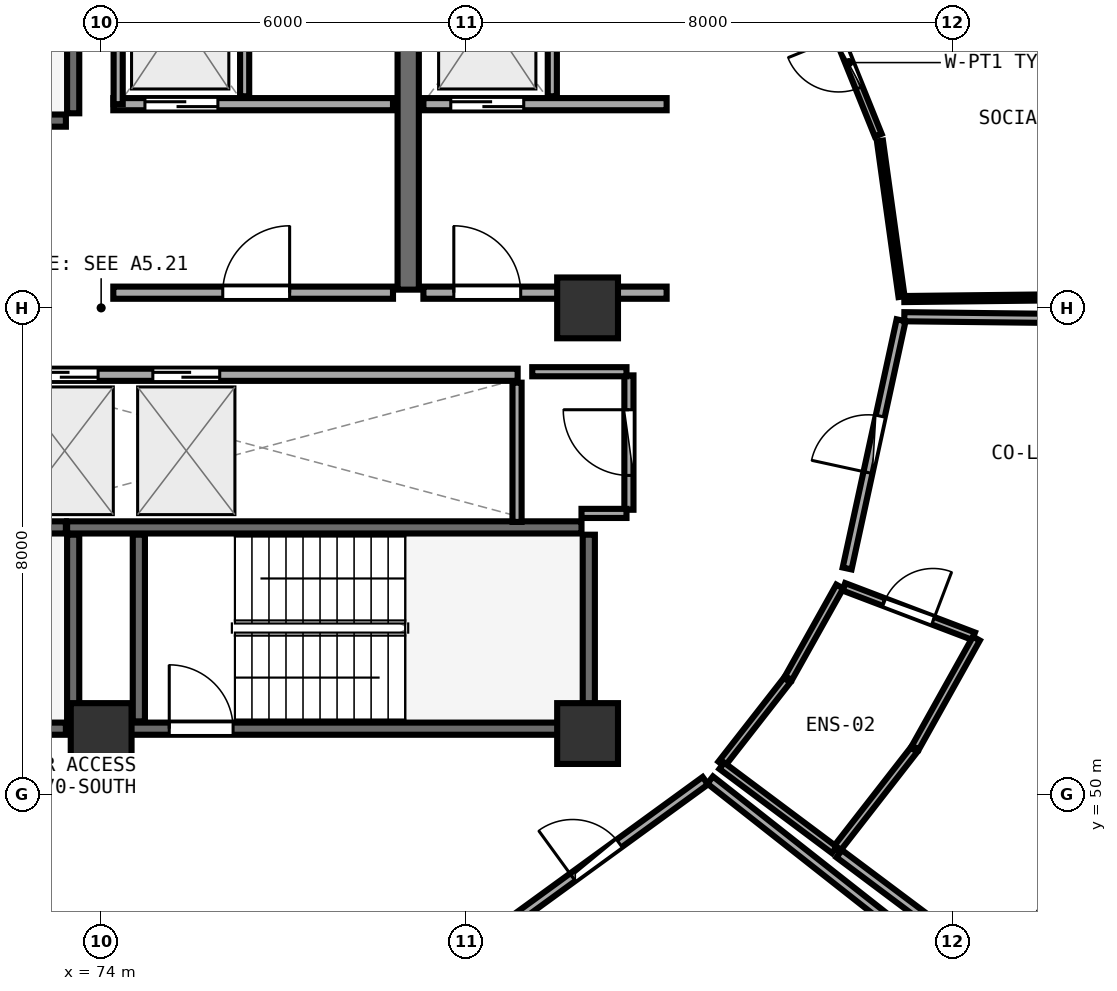
"""IFC4 building model, lengths in metres.
Left out: names, types, materials, properties, quantities, classifications, styles, units other than length and angle.
Written with IfcOpenShell. Run it as: python <this file> out.ifc"""

import sys

from ifc_helpers import new_model, si_unit, direction, frame, frame_2d, origin, origin_2d, place, context, subcontext, project, spatial, rectangle, extrude, element, fill, save


model = new_model("IFC4")
c1 = context("Model", 3, precision=1e-05, world=origin(), true_north=direction((0.0, 1.0)))
c2 = subcontext(c1, "Body", "Model", "MODEL_VIEW")
j1 = project(units=[si_unit("LENGTHUNIT", "METRE"), si_unit("PLANEANGLEUNIT", "RADIAN")], contexts=[c1])
p1 = place(None, origin())
s1 = spatial("IfcSite", under=j1, at=p1, CompositionType="ELEMENT")
p2 = place(p1, origin())
s2 = spatial("IfcBuilding", under=s1, at=p2, CompositionType="ELEMENT")
p3 = place(p2, frame((0.0, 0.0, 274.95)))
s3 = spatial("IfcBuildingStorey", under=s2, at=p3, CompositionType="ELEMENT", Elevation=274.95)
for number, where, z_axis, x_axis in (
    (1, (74.0, 51.0, 0.0), (0.0, 0.0, 1.0), (1.0, 0.0, 0.0)),
    (2, (82.0, 51.0, 0.0), (0.0, 0.0, 1.0), (1.0, 0.0, 0.0)),
    (3, (82.0, 58.0, 0.0), (0.0, 0.0, 1.0), (1.0, 0.0, 0.0)),
):
    element("IfcColumn", number, at=place(p3, frame(where, z_axis=z_axis, x_axis=x_axis)), inside=s3, PredefinedType="PILASTER", context=c2, shape_type="SweptSolid", body=[
        extrude(rectangle(XDim=1.0, YDim=1.0, at=origin_2d()), origin(), (0.0, 0.0, 1.0), 3.75),
    ])
p4 = place(p3, frame((66.26, 61.08, 0.0), z_axis=(0.0, 0.0, 1.0), x_axis=(1.0, 0.0, 0.0)))
e4 = element("IfcWall", 4, at=p4, inside=s3, PredefinedType="SHEAR", context=c2, shape_type="SweptSolid", body=[
    extrude(rectangle(XDim=7.16, YDim=0.2, at=frame_2d((3.58, 0.0))), origin(), (0.0, 0.0, 1.0), 3.49),
])
p5 = place(p3, frame((73.54, 61.2, 0.0), z_axis=(0.0, 0.0, 1.0), x_axis=(0.0, 1.0, 0.0)))
e5 = element("IfcWall", 5, at=p5, inside=s3, PredefinedType="SHEAR", context=c2, shape_type="SweptSolid", body=[
    extrude(rectangle(XDim=3.07, YDim=0.2, at=frame_2d((1.535, 0.0))), origin(), (0.0, 0.0, 1.0), 3.49),
])
p6 = place(p3, frame((74.0, 51.08, 0.0), z_axis=(0.0, 0.0, 1.0), x_axis=(1.0, 0.0, 0.0)))
e6 = element("IfcWall", 6, at=p6, inside=s3, PredefinedType="SHEAR", context=c2, shape_type="SweptSolid", body=[
    extrude(rectangle(XDim=7.9, YDim=0.2, at=frame_2d((3.95, 0.0))), origin(), (0.0, 0.0, 1.0), 3.49),
])
p7 = place(p6, frame((1.12, 0.0, 0.0)))
e7 = element("IfcOpeningElement", 7, at=p7, cuts=e6, PredefinedType="OPENING", context=c2, shape_type="SweptSolid", body=[
    extrude(rectangle(XDim=1.05, YDim=2.1, at=frame_2d((0.525, 1.05))), frame((0.0, 0.11, 0.0), z_axis=(0.0, -1.0, 0.0), x_axis=(1.0, 0.0, 0.0)), (0.0, 0.0, 1.0), 0.22),
])
p8 = place(p3, frame((82.02, 51.2, 0.0), z_axis=(0.0, 0.0, 1.0), x_axis=(0.0, 1.0, 0.0)))
e8 = element("IfcWall", 8, at=p8, inside=s3, PredefinedType="SHEAR", context=c2, shape_type="SweptSolid", body=[
    extrude(rectangle(XDim=3.07, YDim=0.2, at=frame_2d((1.535, 0.0))), origin(), (0.0, 0.0, 1.0), 3.49),
])
p9 = place(p3, frame((81.9, 54.39, 0.0), z_axis=(0.0, 0.0, 1.0), x_axis=(-1.0, 0.0, 0.0)))
e9 = element("IfcWall", 9, at=p9, inside=s3, PredefinedType="SHEAR", context=c2, shape_type="SweptSolid", body=[
    extrude(rectangle(XDim=8.46, YDim=0.2, at=frame_2d((4.23, 0.0))), origin(), (0.0, 0.0, 1.0), 3.49),
])
p10 = place(p3, frame((74.62, 54.27, 0.0), z_axis=(0.0, 0.0, 1.0), x_axis=(0.0, -1.0, 0.0)))
e10 = element("IfcWall", 10, at=p10, inside=s3, PredefinedType="SHEAR", context=c2, shape_type="SweptSolid", body=[
    extrude(rectangle(XDim=3.07, YDim=0.2, at=frame_2d((1.535, 0.0))), origin(), (0.0, 0.0, 1.0), 3.49),
])
p11 = place(p3, frame((66.26, 51.08, 0.0), z_axis=(0.0, 0.0, 1.0), x_axis=(1.0, 0.0, 0.0)))
e11 = element("IfcWall", 11, at=p11, inside=s3, PredefinedType="SHEAR", context=c2, shape_type="SweptSolid", body=[
    extrude(rectangle(XDim=7.16, YDim=0.2, at=frame_2d((3.58, 0.0))), origin(), (0.0, 0.0, 1.0), 3.49),
])
p12 = place(p3, frame((73.54, 51.2, 0.0), z_axis=(0.0, 0.0, 1.0), x_axis=(0.0, 1.0, 0.0)))
e12 = element("IfcWall", 12, at=p12, inside=s3, PredefinedType="SHEAR", context=c2, shape_type="SweptSolid", body=[
    extrude(rectangle(XDim=3.07, YDim=0.2, at=frame_2d((1.535, 0.0))), origin(), (0.0, 0.0, 1.0), 3.49),
])
p13 = place(p3, frame((73.42, 54.39, 0.0), z_axis=(0.0, 0.0, 1.0), x_axis=(-1.0, 0.0, 0.0)))
e13 = element("IfcWall", 13, at=p13, inside=s3, PredefinedType="SHEAR", context=c2, shape_type="SweptSolid", body=[
    extrude(rectangle(XDim=7.16, YDim=0.2, at=frame_2d((3.58, 0.0))), origin(), (0.0, 0.0, 1.0), 3.49),
])
p14 = place(p3, frame((79.05, 58.3, 0.0), z_axis=(0.0, 0.0, 1.0), x_axis=(0.0, 1.0, 0.0)))
e14 = element("IfcWall", 14, at=p14, inside=s3, PredefinedType="SHEAR", context=c2, shape_type="SweptSolid", body=[
    extrude(rectangle(XDim=6.3, YDim=0.35, at=frame_2d((3.15, 0.0))), origin(), (0.0, 0.0, 1.0), 3.49),
])
p15 = place(p3, frame((74.2, 61.35, 0.0), z_axis=(0.0, 0.0, 1.0), x_axis=(1.0, 0.0, 0.0)))
e15 = element("IfcWall", 15, at=p15, inside=s3, PredefinedType="SOLIDWALL", context=c2, shape_type="SweptSolid", body=[
    extrude(rectangle(XDim=4.6, YDim=0.2, at=frame_2d((2.3, 0.0))), origin(), (0.0, 0.0, 1.0), 3.48),
])
p16 = place(p15, frame((0.52, 0.0, 0.0)))
e16 = element("IfcOpeningElement", 16, at=p16, cuts=e15, PredefinedType="OPENING", context=c2, shape_type="SweptSolid", body=[
    extrude(rectangle(XDim=1.2, YDim=2.15, at=frame_2d((0.6, 1.075))), frame((0.0, 0.11, 0.0), z_axis=(0.0, -1.0, 0.0), x_axis=(1.0, 0.0, 0.0)), (0.0, 0.0, 1.0), 0.22),
])
p17 = place(p3, frame((74.28, 61.35, 0.0), z_axis=(0.0, 0.0, 1.0), x_axis=(0.0, 1.0, 0.0)))
e17 = element("IfcWall", 17, at=p17, inside=s3, PredefinedType="PARTITIONING", context=c2, shape_type="SweptSolid", body=[
    extrude(rectangle(XDim=2.97, YDim=0.15, at=frame_2d((1.485, 0.0))), origin(), (0.0, 0.0, 1.0), 3.48),
])
p18 = place(p3, frame((76.36, 61.48, 0.0), z_axis=(0.0, 0.0, 1.0), x_axis=(0.0, 1.0, 0.0)))
e18 = element("IfcWall", 18, at=p18, inside=s3, PredefinedType="PARTITIONING", context=c2, shape_type="SweptSolid", body=[
    extrude(rectangle(XDim=2.84, YDim=0.15, at=frame_2d((1.42, 0.0))), origin(), (0.0, 0.0, 1.0), 3.48),
])
p19 = place(p3, frame((79.3, 61.35, 0.0), z_axis=(0.0, 0.0, 1.0), x_axis=(1.0, 0.0, 0.0)))
e19 = element("IfcWall", 19, at=p19, inside=s3, PredefinedType="SOLIDWALL", context=c2, shape_type="SweptSolid", body=[
    extrude(rectangle(XDim=4.0, YDim=0.2, at=frame_2d((2.0, 0.0))), origin(), (0.0, 0.0, 1.0), 2.775),
])
p20 = place(p19, frame((0.45, 0.0, 0.0)))
e20 = element("IfcOpeningElement", 20, at=p20, cuts=e19, PredefinedType="OPENING", context=c2, shape_type="SweptSolid", body=[
    extrude(rectangle(XDim=1.2, YDim=2.15, at=frame_2d((0.6, 1.075))), frame((0.0, 0.11, 0.0), z_axis=(0.0, -1.0, 0.0), x_axis=(1.0, 0.0, 0.0)), (0.0, 0.0, 1.0), 0.22),
])
p21 = place(p3, frame((81.42, 61.48, 0.0), z_axis=(0.0, 0.0, 1.0), x_axis=(0.0, 1.0, 0.0)))
e21 = element("IfcWall", 21, at=p21, inside=s3, PredefinedType="PARTITIONING", context=c2, shape_type="SweptSolid", body=[
    extrude(rectangle(XDim=2.84, YDim=0.15, at=frame_2d((1.42, 0.0))), origin(), (0.0, 0.0, 1.0), 3.48),
])
p22 = place(p3, frame((74.2, 58.25, 0.0), z_axis=(0.0, 0.0, 1.0), x_axis=(1.0, 0.0, 0.0)))
e22 = element("IfcWall", 22, at=p22, inside=s3, PredefinedType="SOLIDWALL", context=c2, shape_type="SweptSolid", body=[
    extrude(rectangle(XDim=4.6, YDim=0.2, at=frame_2d((2.3, 0.0))), origin(), (0.0, 0.0, 1.0), 3.48),
])
p23 = place(p22, frame((1.8, 0.0, 0.0)))
e23 = element("IfcOpeningElement", 23, at=p23, cuts=e22, PredefinedType="OPENING", context=c2, shape_type="SweptSolid", body=[
    extrude(rectangle(XDim=1.1, YDim=2.1, at=frame_2d((0.55, 1.05))), frame((0.0, 0.11, 0.0), z_axis=(0.0, -1.0, 0.0), x_axis=(1.0, 0.0, 0.0)), (0.0, 0.0, 1.0), 0.22),
])
p24 = place(p3, frame((79.3, 58.25, 0.0), z_axis=(0.0, 0.0, 1.0), x_axis=(1.0, 0.0, 0.0)))
e24 = element("IfcWall", 24, at=p24, inside=s3, PredefinedType="SOLIDWALL", context=c2, shape_type="SweptSolid", body=[
    extrude(rectangle(XDim=4.0, YDim=0.2, at=frame_2d((2.0, 0.0))), origin(), (0.0, 0.0, 1.0), 2.775),
])
p25 = place(p24, frame((0.5, 0.0, 0.0)))
e25 = element("IfcOpeningElement", 25, at=p25, cuts=e24, PredefinedType="OPENING", context=c2, shape_type="SweptSolid", body=[
    extrude(rectangle(XDim=1.1, YDim=2.1, at=frame_2d((0.55, 1.05))), frame((0.0, 0.11, 0.0), z_axis=(0.0, -1.0, 0.0), x_axis=(1.0, 0.0, 0.0)), (0.0, 0.0, 1.0), 0.22),
])
p26 = place(p3, frame((72.45, 56.9, 0.0), z_axis=(0.0, 0.0, 1.0), x_axis=(1.0, 0.0, 0.0)))
e26 = element("IfcWall", 26, at=p26, inside=s3, PredefinedType="SOLIDWALL", context=c2, shape_type="SweptSolid", body=[
    extrude(rectangle(XDim=8.4, YDim=0.2, at=frame_2d((4.2, 0.0))), origin(), (0.0, 0.0, 1.0), 3.48),
])
p27 = place(p26, frame((0.4, 0.0, 0.0)))
e27 = element("IfcOpeningElement", 27, at=p27, cuts=e26, PredefinedType="OPENING", context=c2, shape_type="SweptSolid", body=[
    extrude(rectangle(XDim=1.1, YDim=2.1, at=frame_2d((0.55, 1.05))), frame((0.0, 0.11, 0.0), z_axis=(0.0, -1.0, 0.0), x_axis=(1.0, 0.0, 0.0)), (0.0, 0.0, 1.0), 0.22),
])
p28 = place(p26, frame((2.4, 0.0, 0.0)))
e28 = element("IfcOpeningElement", 28, at=p28, cuts=e26, PredefinedType="OPENING", context=c2, shape_type="SweptSolid", body=[
    extrude(rectangle(XDim=1.1, YDim=2.1, at=frame_2d((0.55, 1.05))), frame((0.0, 0.11, 0.0), z_axis=(0.0, -1.0, 0.0), x_axis=(1.0, 0.0, 0.0)), (0.0, 0.0, 1.0), 0.22),
])
p29 = place(p3, frame((80.84, 54.48, 0.0), z_axis=(0.0, 0.0, 1.0), x_axis=(0.0, 1.0, 0.0)))
e29 = element("IfcWall", 29, at=p29, inside=s3, PredefinedType="PARTITIONING", context=c2, shape_type="SweptSolid", body=[
    extrude(rectangle(XDim=2.29, YDim=0.15, at=frame_2d((1.145, 0.0))), origin(), (0.0, 0.0, 1.0), 3.48),
])
p30 = place(p3, frame((82.68, 54.68, 0.0), z_axis=(0.0, 0.0, 1.0), x_axis=(0.0, 1.0, 0.0)))
e30 = element("IfcWall", 30, at=p30, inside=s3, PredefinedType="PARTITIONING", context=c2, shape_type="SweptSolid", body=[
    extrude(rectangle(XDim=2.21, YDim=0.15, at=frame_2d((1.105, 0.0))), origin(), (0.0, 0.0, 1.0), 3.48),
])
p31 = place(p30, frame((0.565, 0.0, 0.0)))
e31 = element("IfcOpeningElement", 31, at=p31, cuts=e30, PredefinedType="OPENING", context=c2, shape_type="SweptSolid", body=[
    extrude(rectangle(XDim=1.08, YDim=2.1, at=frame_2d((0.54, 1.05))), frame((0.0, 0.085, 0.0), z_axis=(0.0, -1.0, 0.0), x_axis=(1.0, 0.0, 0.0)), (0.0, 0.0, 1.0), 0.17),
])
p32 = place(p3, frame((80.34, 47.607, 0.0), z_axis=(0.0, 0.0, 1.0), x_axis=(0.808603155837, 0.588354430909, 0.0)))
e32 = element("IfcWall", 32, at=p32, inside=s3, PredefinedType="PARTITIONING", context=c2, shape_type="SweptSolid", body=[
    extrude(rectangle(XDim=4.448, YDim=0.15, at=frame_2d((2.224, 0.0))), origin(), (0.0, 0.0, 1.0), 3.075),
])
p33 = place(p32, frame((1.749, 0.0, 0.0)))
e33 = element("IfcOpeningElement", 33, at=p33, cuts=e32, PredefinedType="OPENING", context=c2, shape_type="SweptSolid", body=[
    extrude(rectangle(XDim=0.95, YDim=2.08, at=frame_2d((0.475, 1.04))), frame((0.0, 0.085, 0.0), z_axis=(0.0, -1.0, 0.0), x_axis=(1.0, 0.0, 0.0)), (0.0, 0.0, 1.0), 0.17),
])
p34 = place(p3, frame((86.213, 53.414, 0.0), z_axis=(0.0, 0.0, 1.0), x_axis=(0.934596057468, -0.355710850784, 0.0)))
e34 = element("IfcWall", 34, at=p34, inside=s3, PredefinedType="PLUMBINGWALL", context=c2, shape_type="SweptSolid", body=[
    extrude(rectangle(XDim=2.284, YDim=0.13, at=frame_2d((1.142, 0.0))), origin(), (0.0, 0.0, 1.0), 3.175),
])
p35 = place(p34, frame((0.712, 0.0, 0.0)))
e35 = element("IfcOpeningElement", 35, at=p35, cuts=e34, PredefinedType="OPENING", context=c2, shape_type="SweptSolid", body=[
    extrude(rectangle(XDim=0.86, YDim=2.05, at=frame_2d((0.43, 1.025))), frame((0.0, 0.075, 0.0), z_axis=(0.0, -1.0, 0.0), x_axis=(1.0, 0.0, 0.0)), (0.0, 0.0, 1.0), 0.15),
])
p36 = place(p3, frame((86.269, 53.715, 0.0), z_axis=(0.0, 0.0, 1.0), x_axis=(0.212453909159, 0.977171088645, 0.0)))
e36 = element("IfcWall", 36, at=p36, inside=s3, PredefinedType="PARTITIONING", context=c2, shape_type="SweptSolid", body=[
    extrude(rectangle(XDim=4.177, YDim=0.15, at=frame_2d((2.089, 0.0))), origin(), (0.0, 0.0, 1.0), 3.48),
])
p37 = place(p36, frame((1.614, 0.0, 0.0)))
e37 = element("IfcOpeningElement", 37, at=p37, cuts=e36, PredefinedType="OPENING", context=c2, shape_type="SweptSolid", body=[
    extrude(rectangle(XDim=0.95, YDim=2.08, at=frame_2d((0.475, 1.04))), frame((0.0, 0.085, 0.0), z_axis=(0.0, -1.0, 0.0), x_axis=(1.0, 0.0, 0.0)), (0.0, 0.0, 1.0), 0.17),
])
p38 = place(p3, frame((86.781, 60.84, 0.0), z_axis=(0.0, 0.0, 1.0), x_axis=(-0.374574284654, 0.927196907499, 0.0)))
e38 = element("IfcWall", 38, at=p38, inside=s3, PredefinedType="PARTITIONING", context=c2, shape_type="SweptSolid", body=[
    extrude(rectangle(XDim=2.576, YDim=0.12, at=frame_2d((1.288, 0.0))), origin(), (0.0, 0.0, 1.0), 3.48),
])
p39 = place(p38, frame((0.838, 0.0, 0.0)))
e39 = element("IfcOpeningElement", 39, at=p39, cuts=e38, PredefinedType="OPENING", context=c2, shape_type="SweptSolid", body=[
    extrude(rectangle(XDim=0.9, YDim=2.08, at=frame_2d((0.45, 1.04))), frame((0.0, 0.07, 0.0), z_axis=(0.0, -1.0, 0.0), x_axis=(1.0, 0.0, 0.0)), (0.0, 0.0, 1.0), 0.14),
])
p40 = place(p3, frame((81.9, 54.62, 0.0), z_axis=(0.0, 0.0, 1.0), x_axis=(1.0, 0.0, 0.0)))
e40 = element("IfcWall", 40, at=p40, inside=s3, PredefinedType="PARTITIONING", context=c2, shape_type="SweptSolid", body=[
    extrude(rectangle(XDim=0.74, YDim=0.15, at=frame_2d((0.37, 0.0))), origin(), (0.0, 0.0, 1.0), 2.775),
])
p41 = place(p3, frame((82.64, 56.95, 0.0), z_axis=(0.0, 0.0, 1.0), x_axis=(-1.0, 0.0, 0.0)))
e41 = element("IfcWall", 41, at=p41, inside=s3, PredefinedType="PARTITIONING", context=c2, shape_type="SweptSolid", body=[
    extrude(rectangle(XDim=1.55, YDim=0.15, at=frame_2d((0.775, 0.0))), origin(), (0.0, 0.0, 1.0), 2.775),
])
p42 = place(p3, frame((84.016, 50.235, 0.0), z_axis=(0.0, 0.0, 1.0), x_axis=(0.785736749878, -0.618561039745, 0.0)))
e42 = element("IfcWall", 42, at=p42, inside=s3, PredefinedType="PARTITIONING", context=c2, shape_type="SweptSolid", body=[
    extrude(rectangle(XDim=4.475, YDim=0.15, at=frame_2d((2.237, 0.0))), origin(), (0.0, 0.0, 1.0), 3.075),
])
p43 = place(p3, frame((84.203, 50.498, 0.0), z_axis=(0.0, 0.0, 1.0), x_axis=(0.615627813602, 0.78803705187, 0.0)))
e43 = element("IfcWall", 43, at=p43, inside=s3, PredefinedType="PLUMBINGWALL", context=c2, shape_type="SweptSolid", body=[
    extrude(rectangle(XDim=1.752, YDim=0.13, at=frame_2d((0.876, 0.0))), origin(), (0.0, 0.0, 1.0), 3.075),
])
p44 = place(p3, frame((85.304, 51.911, 0.0), z_axis=(0.0, 0.0, 1.0), x_axis=(0.488642128311, 0.872484309566, 0.0)))
e44 = element("IfcWall", 44, at=p44, inside=s3, PredefinedType="PLUMBINGWALL", context=c2, shape_type="SweptSolid", body=[
    extrude(rectangle(XDim=1.726, YDim=0.13, at=frame_2d((0.863, 0.0))), origin(), (0.0, 0.0, 1.0), 3.235),
])
p45 = place(p3, frame((88.394, 52.562, 0.0), z_axis=(0.0, 0.0, 1.0), x_axis=(-0.487959720546, -0.872866147313, 0.0)))
e45 = element("IfcWall", 45, at=p45, inside=s3, PredefinedType="PLUMBINGWALL", context=c2, shape_type="SweptSolid", body=[
    extrude(rectangle(XDim=2.056, YDim=0.13, at=frame_2d((1.028, 0.0))), origin(), (0.0, 0.0, 1.0), 3.075),
])
p46 = place(p3, frame((87.369, 50.734, 0.0), z_axis=(0.0, 0.0, 1.0), x_axis=(-0.614418714287, -0.788980128732, 0.0)))
e46 = element("IfcWall", 46, at=p46, inside=s3, PredefinedType="PLUMBINGWALL", context=c2, shape_type="SweptSolid", body=[
    extrude(rectangle(XDim=2.085, YDim=0.13, at=frame_2d((1.042, 0.0))), origin(), (0.0, 0.0, 1.0), 3.48),
])
p47 = place(p3, frame((86.059, 49.085, 0.0), z_axis=(0.0, 0.0, 1.0), x_axis=(-0.800835318147, 0.598884624288, 0.0)))
e47 = element("IfcWall", 47, at=p47, inside=s3, PredefinedType="PLUMBINGWALL", context=c2, shape_type="SweptSolid", body=[
    extrude(rectangle(XDim=2.313, YDim=0.13, at=frame_2d((1.156, 0.0))), origin(), (0.0, 0.0, 1.0), 3.175),
])
p48 = place(p3, frame((87.209, 57.854, 0.0), z_axis=(0.0, 0.0, 1.0), x_axis=(0.999937174585, -0.01120923205, 0.0)))
e48 = element("IfcWall", 48, at=p48, inside=s3, PredefinedType="PARTITIONING", context=c2, shape_type="SweptSolid", body=[
    extrude(rectangle(XDim=4.639, YDim=0.15, at=frame_2d((2.32, 0.0))), origin(), (0.0, 0.0, 1.0), 3.075),
])
p49 = place(p3, frame((87.756, 47.812, 0.0), z_axis=(0.0, 0.0, 1.0), x_axis=(-0.800376717426, 0.599497381314, 0.0)))
e49 = element("IfcWall", 49, at=p49, inside=s3, PredefinedType="PARTITIONING", context=c2, shape_type="SweptSolid", body=[
    extrude(rectangle(XDim=2.021, YDim=0.15, at=frame_2d((1.011, 0.0))), origin(), (0.0, 0.0, 1.0), 3.235),
])
p50 = place(p3, frame((87.164, 58.185, 0.0), z_axis=(0.0, 0.0, 1.0), x_axis=(-0.137359832701, 0.990521214493, 0.0)))
e50 = element("IfcWall", 50, at=p50, inside=s3, PredefinedType="PARTITIONING", context=c2, shape_type="SweptSolid", body=[
    extrude(rectangle(XDim=2.584, YDim=0.1, at=frame_2d((1.292, 0.0))), origin(), (0.0, 0.0, 1.0), 3.48),
])
p51 = place(p3, frame((91.848, 58.198, 0.0), z_axis=(0.0, 0.0, 1.0), x_axis=(-0.999937174585, -0.01120923205, 0.0)))
e51 = element("IfcWall", 51, at=p51, inside=s3, PredefinedType="PARTITIONING", context=c2, shape_type="SweptSolid", body=[
    extrude(rectangle(XDim=4.639, YDim=0.1, at=frame_2d((2.32, 0.0))), origin(), (0.0, 0.0, 1.0), 3.075),
])
p52 = place(p7, origin())
e52 = element("IfcDoor", 52, at=p52, inside=s3, OperationType="SINGLE_SWING_LEFT", PredefinedType="DOOR", context=c2, shape_type="SweptSolid", body=[
    extrude(rectangle(XDim=1.05, YDim=2.1, at=frame_2d((0.525, 1.05))), frame((0.0, 0.025, 0.0), z_axis=(0.0, -1.0, 0.0), x_axis=(1.0, 0.0, 0.0)), (0.0, 0.0, 1.0), 0.05),
])
fill(e7, e52)
p53 = place(p16, origin())
e53 = element("IfcDoor", 53, at=p53, inside=s3, OperationType="DOUBLE_DOOR_SLIDING", PredefinedType="DOOR", context=c2, shape_type="SweptSolid", body=[
    extrude(rectangle(XDim=1.2, YDim=2.15, at=frame_2d((0.6, 1.075))), frame((0.0, 0.025, 0.0), z_axis=(0.0, -1.0, 0.0), x_axis=(1.0, 0.0, 0.0)), (0.0, 0.0, 1.0), 0.05),
])
fill(e16, e53)
p54 = place(p20, origin())
e54 = element("IfcDoor", 54, at=p54, inside=s3, OperationType="DOUBLE_DOOR_SLIDING", PredefinedType="DOOR", context=c2, shape_type="SweptSolid", body=[
    extrude(rectangle(XDim=1.2, YDim=2.15, at=frame_2d((0.6, 1.075))), frame((0.0, 0.025, 0.0), z_axis=(0.0, -1.0, 0.0), x_axis=(1.0, 0.0, 0.0)), (0.0, 0.0, 1.0), 0.05),
])
fill(e20, e54)
p55 = place(p23, frame((1.1, 0.0, 0.0), z_axis=(0.0, 0.0, 1.0), x_axis=(-1.0, 0.0, 0.0)))
e55 = element("IfcDoor", 55, at=p55, inside=s3, OperationType="SINGLE_SWING_LEFT", PredefinedType="DOOR", context=c2, shape_type="SweptSolid", body=[
    extrude(rectangle(XDim=1.1, YDim=2.1, at=frame_2d((0.55, 1.05))), frame((0.0, 0.025, 0.0), z_axis=(0.0, -1.0, 0.0), x_axis=(1.0, 0.0, 0.0)), (0.0, 0.0, 1.0), 0.05),
])
fill(e23, e55)
p56 = place(p25, frame((1.1, 0.0, 0.0), z_axis=(0.0, 0.0, 1.0), x_axis=(-1.0, 0.0, 0.0)))
e56 = element("IfcDoor", 56, at=p56, inside=s3, OperationType="SINGLE_SWING_RIGHT", PredefinedType="DOOR", context=c2, shape_type="SweptSolid", body=[
    extrude(rectangle(XDim=1.1, YDim=2.1, at=frame_2d((0.55, 1.05))), frame((0.0, 0.025, 0.0), z_axis=(0.0, -1.0, 0.0), x_axis=(1.0, 0.0, 0.0)), (0.0, 0.0, 1.0), 0.05),
])
fill(e25, e56)
p57 = place(p27, origin())
e57 = element("IfcDoor", 57, at=p57, inside=s3, OperationType="DOUBLE_DOOR_SLIDING", PredefinedType="DOOR", context=c2, shape_type="SweptSolid", body=[
    extrude(rectangle(XDim=1.1, YDim=2.1, at=frame_2d((0.55, 1.05))), frame((0.0, 0.025, 0.0), z_axis=(0.0, -1.0, 0.0), x_axis=(1.0, 0.0, 0.0)), (0.0, 0.0, 1.0), 0.05),
])
fill(e27, e57)
p58 = place(p28, origin())
e58 = element("IfcDoor", 58, at=p58, inside=s3, OperationType="DOUBLE_DOOR_SLIDING", PredefinedType="DOOR", context=c2, shape_type="SweptSolid", body=[
    extrude(rectangle(XDim=1.1, YDim=2.1, at=frame_2d((0.55, 1.05))), frame((0.0, 0.025, 0.0), z_axis=(0.0, -1.0, 0.0), x_axis=(1.0, 0.0, 0.0)), (0.0, 0.0, 1.0), 0.05),
])
fill(e28, e58)
p59 = place(p31, origin())
e59 = element("IfcDoor", 59, at=p59, inside=s3, OperationType="SINGLE_SWING_RIGHT", PredefinedType="DOOR", context=c2, shape_type="SweptSolid", body=[
    extrude(rectangle(XDim=1.08, YDim=2.1, at=frame_2d((0.54, 1.05))), frame((0.0, 0.025, 0.0), z_axis=(0.0, -1.0, 0.0), x_axis=(1.0, 0.0, 0.0)), (0.0, 0.0, 1.0), 0.05),
])
fill(e31, e59)
p60 = place(p33, origin())
e60 = element("IfcDoor", 60, at=p60, inside=s3, OperationType="SINGLE_SWING_LEFT", PredefinedType="DOOR", context=c2, shape_type="SweptSolid", body=[
    extrude(rectangle(XDim=0.95, YDim=2.08, at=frame_2d((0.475, 1.04))), frame((0.0, 0.025, 0.0), z_axis=(0.0, -1.0, 0.0), x_axis=(1.0, 0.0, 0.0)), (0.0, 0.0, 1.0), 0.05),
])
fill(e33, e60)
p61 = place(p35, origin())
e61 = element("IfcDoor", 61, at=p61, inside=s3, OperationType="SINGLE_SWING_RIGHT", PredefinedType="DOOR", context=c2, shape_type="SweptSolid", body=[
    extrude(rectangle(XDim=0.86, YDim=2.05, at=frame_2d((0.43, 1.025))), frame((0.0, 0.025, 0.0), z_axis=(0.0, -1.0, 0.0), x_axis=(1.0, 0.0, 0.0)), (0.0, 0.0, 1.0), 0.05),
])
fill(e35, e61)
p62 = place(p37, origin())
e62 = element("IfcDoor", 62, at=p62, inside=s3, OperationType="SINGLE_SWING_LEFT", PredefinedType="DOOR", context=c2, shape_type="SweptSolid", body=[
    extrude(rectangle(XDim=0.95, YDim=2.08, at=frame_2d((0.475, 1.04))), frame((0.0, 0.025, 0.0), z_axis=(0.0, -1.0, 0.0), x_axis=(1.0, 0.0, 0.0)), (0.0, 0.0, 1.0), 0.05),
])
fill(e37, e62)
p63 = place(p39, origin())
e63 = element("IfcDoor", 63, at=p63, inside=s3, OperationType="SINGLE_SWING_RIGHT", PredefinedType="DOOR", context=c2, shape_type="SweptSolid", body=[
    extrude(rectangle(XDim=0.9, YDim=2.08, at=frame_2d((0.45, 1.04))), frame((0.0, 0.025, 0.0), z_axis=(0.0, -1.0, 0.0), x_axis=(1.0, 0.0, 0.0)), (0.0, 0.0, 1.0), 0.05),
])
fill(e39, e63)
save(model, sys.argv[1])
